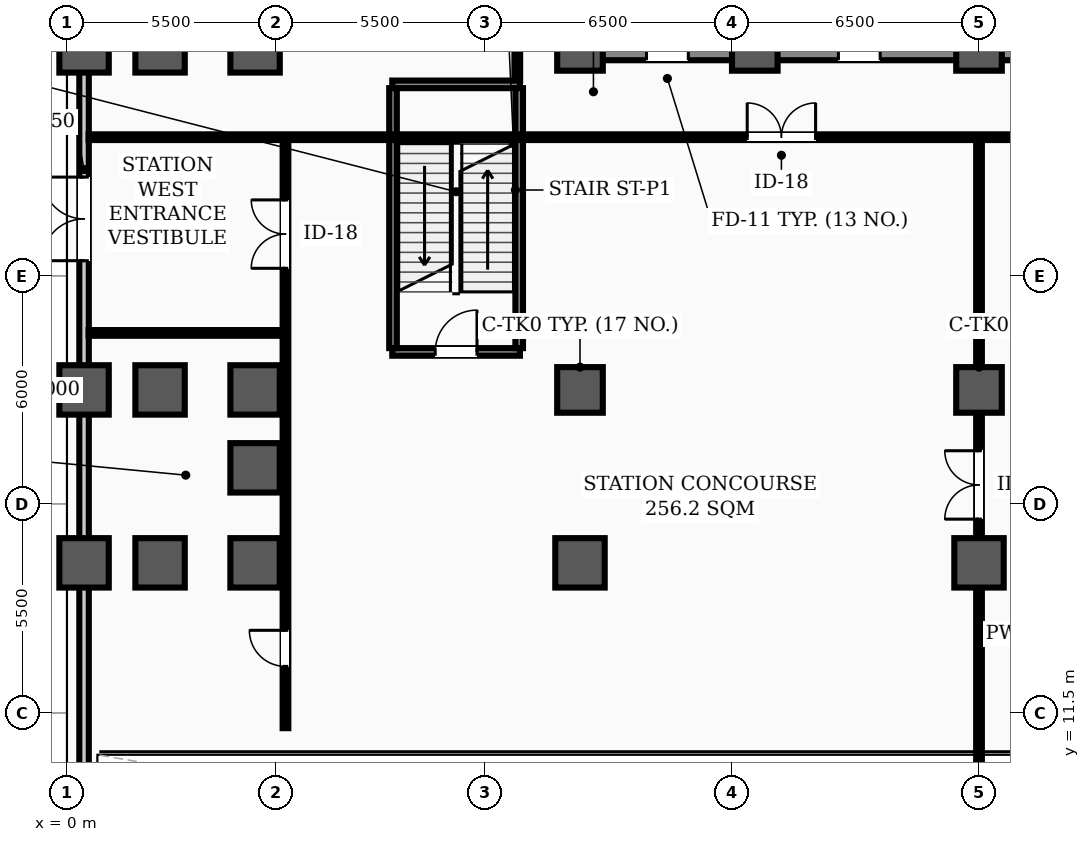
"""IFC4 building model, lengths in metres.
Left out: names, types, materials, properties, quantities, classifications, styles, units other than length and angle.
Written with IfcOpenShell. Run it as: python <this file> out.ifc"""

import sys

from ifc_helpers import new_model, si_unit, direction, frame, frame_2d, origin, origin_2d, place, context, subcontext, project, spatial, rectangle, hollow_rectangle, extrude, element, fill, save


model = new_model("IFC4")
c1 = context("Model", 3, precision=1e-05, world=origin(), true_north=direction((0.0, 1.0)))
c2 = subcontext(c1, "Body", "Model", "MODEL_VIEW")
j1 = project(units=[si_unit("LENGTHUNIT", "METRE"), si_unit("PLANEANGLEUNIT", "RADIAN")], contexts=[c1])
p1 = place(None, origin())
s1 = spatial("IfcSite", under=j1, at=p1, CompositionType="ELEMENT")
p2 = place(p1, origin())
s2 = spatial("IfcBuilding", under=s1, at=p2, CompositionType="ELEMENT")
p3 = place(p2, origin())
s3 = spatial("IfcBuildingStorey", under=s2, at=p3, CompositionType="ELEMENT", Elevation=0.0)
for number, where, z_axis, x_axis in (
    (1, (13.5, 29.0, 0.0), (0.0, 0.0, 1.0), (1.0, 0.0, 0.0)),
    (2, (18.1, 29.0, 0.0), (0.0, 0.0, 1.0), (1.0, 0.0, 0.0)),
    (3, (24.0, 29.0, 0.0), (0.0, 0.0, 1.0), (1.0, 0.0, 0.0)),
    (4, (13.5, 20.0, 0.0), (0.0, 0.0, 1.0), (1.0, 0.0, 0.0)),
    (5, (24.0, 20.0, 0.0), (0.0, 0.0, 1.0), (1.0, 0.0, 0.0)),
):
    element("IfcColumn", number, at=place(p3, frame(where, z_axis=z_axis, x_axis=x_axis)), inside=s3, PredefinedType="COLUMN", context=c2, shape_type="SweptSolid", body=[
        extrude(hollow_rectangle(XDim=1.2, YDim=1.2, WallThickness=0.04, InnerFilletRadius=0.02, OuterFilletRadius=0.06, at=origin_2d()), origin(), (0.0, 0.0, 1.0), 5.8),
    ])
for number, where, z_axis, x_axis in (
    (6, (0.45, 15.45, 0.0), (0.0, 0.0, 1.0), (1.0, 0.0, 0.0)),
    (7, (0.45, 20.0, 0.0), (0.0, 0.0, 1.0), (1.0, 0.0, 0.0)),
    (8, (0.45, 29.0, 0.0), (0.0, 0.0, 1.0), (1.0, 0.0, 0.0)),
    (9, (2.45, 15.45, 0.0), (0.0, 0.0, 1.0), (1.0, 0.0, 0.0)),
    (10, (2.45, 20.0, 0.0), (0.0, 0.0, 1.0), (1.0, 0.0, 0.0)),
    (11, (2.45, 29.0, 0.0), (0.0, 0.0, 1.0), (1.0, 0.0, 0.0)),
    (12, (4.95, 15.45, 0.0), (0.0, 0.0, 1.0), (1.0, 0.0, 0.0)),
    (13, (4.95, 17.95, 0.0), (0.0, 0.0, 1.0), (1.0, 0.0, 0.0)),
    (14, (4.95, 20.0, 0.0), (0.0, 0.0, 1.0), (1.0, 0.0, 0.0)),
    (15, (4.95, 29.0, 0.0), (0.0, 0.0, 1.0), (1.0, 0.0, 0.0)),
    (16, (13.5, 15.45, 0.0), (0.0, 0.0, 1.0), (1.0, 0.0, 0.0)),
    (17, (24.0, 15.45, 0.0), (0.0, 0.0, 1.0), (1.0, 0.0, 0.0)),
):
    element("IfcColumn", number, at=place(p3, frame(where, z_axis=z_axis, x_axis=x_axis)), inside=s3, PredefinedType="COLUMN", context=c2, shape_type="SweptSolid", body=[
        extrude(rectangle(XDim=1.3, YDim=1.3, at=origin_2d()), origin(), (0.0, 0.0, 1.0), 5.8),
    ])
p4 = place(p3, frame((0.45, 0.45, 0.0), z_axis=(0.0, 0.0, 1.0), x_axis=(0.0, 1.0, 0.0)))
e18 = element("IfcWall", 18, at=p4, inside=s3, PredefinedType="STANDARD", context=c2, shape_type="SweptSolid", body=[
    extrude(rectangle(XDim=50.7, YDim=0.25, at=frame_2d((25.35, 0.0))), origin(), (0.0, 0.0, 1.0), 4.75),
])
p5 = place(p4, frame((22.95, 0.0, 0.0)))
e19 = element("IfcOpeningElement", 19, at=p5, cuts=e18, PredefinedType="OPENING", context=c2, shape_type="SweptSolid", body=[
    extrude(rectangle(XDim=2.2, YDim=2.4, at=frame_2d((1.1, 1.2))), frame((0.0, 0.135, 0.0), z_axis=(0.0, -1.0, 0.0), x_axis=(1.0, 0.0, 0.0)), (0.0, 0.0, 1.0), 0.27),
])
p6 = place(p4, frame((4.45, 0.0, 0.0)))
e20 = element("IfcOpeningElement", 20, at=p6, cuts=e18, PredefinedType="OPENING", context=c2, shape_type="SweptSolid", body=[
    extrude(rectangle(XDim=4.8, YDim=2.85, at=frame_2d((2.4, 1.425))), frame((0.0, 0.135, 0.0), z_axis=(0.0, -1.0, 0.0), x_axis=(1.0, 0.0, 0.0)), (0.0, 0.0, 1.0), 0.27),
])
p7 = place(p3, frame((13.5, 29.0, 0.0), z_axis=(0.0, 0.0, 1.0), x_axis=(1.0, 0.0, 0.0)))
e21 = element("IfcWall", 21, at=p7, inside=s3, PredefinedType="SHEAR", context=c2, shape_type="SweptSolid", body=[
    extrude(rectangle(XDim=30.5, YDim=0.65, at=frame_2d((15.25, 0.0))), origin(), (0.0, 0.0, 1.0), 5.55),
])
p8 = place(p7, frame((1.75, 0.0, 0.0)))
e22 = element("IfcOpeningElement", 22, at=p8, cuts=e21, PredefinedType="OPENING", context=c2, shape_type="SweptSolid", body=[
    extrude(rectangle(XDim=1.1, YDim=2.08, at=frame_2d((0.55, 1.04))), frame((0.0, 0.335, 0.0), z_axis=(0.0, -1.0, 0.0), x_axis=(1.0, 0.0, 0.0)), (0.0, 0.0, 1.0), 0.67),
])
p9 = place(p7, frame((26.7, 0.0, 0.0)))
e23 = element("IfcOpeningElement", 23, at=p9, cuts=e21, PredefinedType="OPENING", context=c2, shape_type="SweptSolid", body=[
    extrude(rectangle(XDim=1.1, YDim=2.08, at=frame_2d((0.55, 1.04))), frame((0.0, 0.335, 0.0), z_axis=(0.0, -1.0, 0.0), x_axis=(1.0, 0.0, 0.0)), (0.0, 0.0, 1.0), 0.67),
])
p10 = place(p7, frame((6.8, 0.0, 0.0)))
e24 = element("IfcOpeningElement", 24, at=p10, cuts=e21, PredefinedType="OPENING", context=c2, shape_type="SweptSolid", body=[
    extrude(rectangle(XDim=1.1, YDim=2.08, at=frame_2d((0.55, 1.04))), frame((0.0, 0.335, 0.0), z_axis=(0.0, -1.0, 0.0), x_axis=(1.0, 0.0, 0.0)), (0.0, 0.0, 1.0), 0.67),
])
p11 = place(p7, frame((14.3, 0.0, 0.0)))
e25 = element("IfcOpeningElement", 25, at=p11, cuts=e21, PredefinedType="OPENING", context=c2, shape_type="SweptSolid", body=[
    extrude(rectangle(XDim=1.6, YDim=2.08, at=frame_2d((0.8, 1.04))), frame((0.0, 0.335, 0.0), z_axis=(0.0, -1.0, 0.0), x_axis=(1.0, 0.0, 0.0)), (0.0, 0.0, 1.0), 0.67),
])
p12 = place(p7, frame((20.525, 0.0, 0.0)))
e26 = element("IfcOpeningElement", 26, at=p12, cuts=e21, PredefinedType="OPENING", context=c2, shape_type="SweptSolid", body=[
    extrude(rectangle(XDim=0.95, YDim=2.08, at=frame_2d((0.475, 1.04))), frame((0.0, 0.335, 0.0), z_axis=(0.0, -1.0, 0.0), x_axis=(1.0, 0.0, 0.0)), (0.0, 0.0, 1.0), 0.67),
])
p13 = place(p7, frame((12.1, 0.0, 0.0)))
e27 = element("IfcOpeningElement", 27, at=p13, cuts=e21, PredefinedType="OPENING", context=c2, shape_type="SweptSolid", body=[
    extrude(rectangle(XDim=1.3, YDim=2.08, at=frame_2d((0.65, 1.04))), frame((0.0, 0.335, 0.0), z_axis=(0.0, -1.0, 0.0), x_axis=(1.0, 0.0, 0.0)), (0.0, 0.0, 1.0), 0.67),
])
p14 = place(p3, frame((8.56, 21.0, 0.0), z_axis=(0.0, 0.0, 1.0), x_axis=(1.0, 0.0, 0.0)))
e28 = element("IfcWall", 28, at=p14, inside=s3, PredefinedType="STANDARD", context=c2, shape_type="SweptSolid", body=[
    extrude(rectangle(XDim=3.36, YDim=0.2, at=frame_2d((1.68, 0.0))), origin(), (0.0, 0.0, 1.0), 5.55),
])
p15 = place(p14, frame((1.13, 0.0, 0.0)))
e29 = element("IfcOpeningElement", 29, at=p15, cuts=e28, PredefinedType="OPENING", context=c2, shape_type="SweptSolid", body=[
    extrude(rectangle(XDim=1.1, YDim=2.08, at=frame_2d((0.55, 1.04))), frame((0.0, 0.11, 0.0), z_axis=(0.0, -1.0, 0.0), x_axis=(1.0, 0.0, 0.0)), (0.0, 0.0, 1.0), 0.22),
])
p16 = place(p3, frame((8.56, 28.04, 0.0), z_axis=(0.0, 0.0, 1.0), x_axis=(1.0, 0.0, 0.0)))
e30 = element("IfcWall", 30, at=p16, inside=s3, PredefinedType="STANDARD", context=c2, shape_type="SweptSolid", body=[
    extrude(rectangle(XDim=3.36, YDim=0.2, at=frame_2d((1.68, 0.0))), origin(), (0.0, 0.0, 1.0), 5.55),
])
for number, where, z_axis, x_axis in (
    (31, (8.58, 21.1, 0.0), (0.0, 0.0, 1.0), (0.0, 1.0, 0.0)),
    (32, (11.9, 21.1, 0.0), (0.0, 0.0, 1.0), (0.0, 1.0, 0.0)),
):
    element("IfcWall", number, at=place(p3, frame(where, z_axis=z_axis, x_axis=x_axis)), inside=s3, PredefinedType="STANDARD", context=c2, shape_type="SweptSolid", body=[
        extrude(rectangle(XDim=6.84, YDim=0.2, at=frame_2d((3.42, 0.0))), origin(), (0.0, 0.0, 1.0), 5.55),
    ])
p17 = place(p3, frame((0.57, 21.5, 0.0), z_axis=(0.0, 0.0, 1.0), x_axis=(1.0, 0.0, 0.0)))
e33 = element("IfcWall", 33, at=p17, inside=s3, PredefinedType="PARTITIONING", context=c2, shape_type="SweptSolid", body=[
    extrude(rectangle(XDim=5.18, YDim=0.15, at=frame_2d((2.59, 0.0))), origin(), (0.0, 0.0, 1.0), 4.83),
])
p18 = place(p3, frame((0.57, 26.65, 0.0), z_axis=(0.0, 0.0, 1.0), x_axis=(1.0, 0.0, 0.0)))
e34 = element("IfcWall", 34, at=p18, inside=s3, PredefinedType="PARTITIONING", context=c2, shape_type="SweptSolid", body=[
    extrude(rectangle(XDim=58.78, YDim=0.15, at=frame_2d((29.39, 0.0))), origin(), (0.0, 0.0, 1.0), 4.83),
])
p19 = place(p18, frame((17.33, 0.0, 0.0)))
e35 = element("IfcOpeningElement", 35, at=p19, cuts=e34, PredefinedType="OPENING", context=c2, shape_type="SweptSolid", body=[
    extrude(rectangle(XDim=1.8, YDim=2.08, at=frame_2d((0.9, 1.04))), frame((0.0, 0.085, 0.0), z_axis=(0.0, -1.0, 0.0), x_axis=(1.0, 0.0, 0.0)), (0.0, 0.0, 1.0), 0.17),
])
p20 = place(p18, frame((32.78, 0.0, 0.0)))
e36 = element("IfcOpeningElement", 36, at=p20, cuts=e34, PredefinedType="OPENING", context=c2, shape_type="SweptSolid", body=[
    extrude(rectangle(XDim=1.8, YDim=2.08, at=frame_2d((0.9, 1.04))), frame((0.0, 0.085, 0.0), z_axis=(0.0, -1.0, 0.0), x_axis=(1.0, 0.0, 0.0)), (0.0, 0.0, 1.0), 0.17),
])
p21 = place(p18, frame((46.555, 0.0, 0.0)))
e37 = element("IfcOpeningElement", 37, at=p21, cuts=e34, PredefinedType="OPENING", context=c2, shape_type="SweptSolid", body=[
    extrude(rectangle(XDim=0.95, YDim=2.08, at=frame_2d((0.475, 1.04))), frame((0.0, 0.085, 0.0), z_axis=(0.0, -1.0, 0.0), x_axis=(1.0, 0.0, 0.0)), (0.0, 0.0, 1.0), 0.17),
])
p22 = place(p18, frame((51.105, 0.0, 0.0)))
e38 = element("IfcOpeningElement", 38, at=p22, cuts=e34, PredefinedType="OPENING", context=c2, shape_type="SweptSolid", body=[
    extrude(rectangle(XDim=0.95, YDim=2.08, at=frame_2d((0.475, 1.04))), frame((0.0, 0.085, 0.0), z_axis=(0.0, -1.0, 0.0), x_axis=(1.0, 0.0, 0.0)), (0.0, 0.0, 1.0), 0.17),
])
p23 = place(p18, frame((55.355, 0.0, 0.0)))
e39 = element("IfcOpeningElement", 39, at=p23, cuts=e34, PredefinedType="OPENING", context=c2, shape_type="SweptSolid", body=[
    extrude(rectangle(XDim=0.95, YDim=2.08, at=frame_2d((0.475, 1.04))), frame((0.0, 0.085, 0.0), z_axis=(0.0, -1.0, 0.0), x_axis=(1.0, 0.0, 0.0)), (0.0, 0.0, 1.0), 0.17),
])
p24 = place(p3, frame((5.75, 11.1, 0.0), z_axis=(0.0, 0.0, 1.0), x_axis=(0.0, 1.0, 0.0)))
e40 = element("IfcWall", 40, at=p24, inside=s3, PredefinedType="PARTITIONING", context=c2, shape_type="SweptSolid", body=[
    extrude(rectangle(XDim=15.465, YDim=0.15, at=frame_2d((7.732, 0.0))), origin(), (0.0, 0.0, 1.0), 4.73),
])
p25 = place(p24, frame((12.1, 0.0, 0.0)))
e41 = element("IfcOpeningElement", 41, at=p25, cuts=e40, PredefinedType="OPENING", context=c2, shape_type="SweptSolid", body=[
    extrude(rectangle(XDim=1.8, YDim=2.08, at=frame_2d((0.9, 1.04))), frame((0.0, 0.085, 0.0), z_axis=(0.0, -1.0, 0.0), x_axis=(1.0, 0.0, 0.0)), (0.0, 0.0, 1.0), 0.17),
])
p26 = place(p24, frame((1.625, 0.0, 0.0)))
e42 = element("IfcOpeningElement", 42, at=p26, cuts=e40, PredefinedType="OPENING", context=c2, shape_type="SweptSolid", body=[
    extrude(rectangle(XDim=0.95, YDim=2.08, at=frame_2d((0.475, 1.04))), frame((0.0, 0.085, 0.0), z_axis=(0.0, -1.0, 0.0), x_axis=(1.0, 0.0, 0.0)), (0.0, 0.0, 1.0), 0.17),
])
p27 = place(p3, frame((24.0, 0.57, 0.0), z_axis=(0.0, 0.0, 1.0), x_axis=(0.0, 1.0, 0.0)))
e43 = element("IfcWall", 43, at=p27, inside=s3, PredefinedType="PARTITIONING", context=c2, shape_type="SweptSolid", body=[
    extrude(rectangle(XDim=25.995, YDim=0.15, at=frame_2d((12.998, 0.0))), origin(), (0.0, 0.0, 1.0), 4.73),
])
p28 = place(p27, frame((16.03, 0.0, 0.0)))
e44 = element("IfcOpeningElement", 44, at=p28, cuts=e43, PredefinedType="OPENING", context=c2, shape_type="SweptSolid", body=[
    extrude(rectangle(XDim=1.8, YDim=2.08, at=frame_2d((0.9, 1.04))), frame((0.0, 0.085, 0.0), z_axis=(0.0, -1.0, 0.0), x_axis=(1.0, 0.0, 0.0)), (0.0, 0.0, 1.0), 0.17),
])
p29 = place(p3, frame((11.85, 28.15, 0.0), z_axis=(0.0, 0.0, 1.0), x_axis=(0.0, 1.0, 0.0)))
e45 = element("IfcWall", 45, at=p29, inside=s3, PredefinedType="PARTITIONING", context=c2, shape_type="SweptSolid", body=[
    extrude(rectangle(XDim=8.49, YDim=0.15, at=frame_2d((4.245, 0.0))), origin(), (0.0, 0.0, 1.0), 4.73),
])
p30 = place(p5, origin())
e46 = element("IfcDoor", 46, at=p30, inside=s3, OperationType="DOUBLE_DOOR_SINGLE_SWING", PredefinedType="DOOR", context=c2, shape_type="SweptSolid", body=[
    extrude(rectangle(XDim=2.2, YDim=2.4, at=frame_2d((1.1, 1.2))), frame((0.0, 0.025, 0.0), z_axis=(0.0, -1.0, 0.0), x_axis=(1.0, 0.0, 0.0)), (0.0, 0.0, 1.0), 0.05),
])
fill(e19, e46)
p31 = place(p15, origin())
e47 = element("IfcDoor", 47, at=p31, inside=s3, OperationType="SINGLE_SWING_RIGHT", PredefinedType="DOOR", context=c2, shape_type="SweptSolid", body=[
    extrude(rectangle(XDim=1.1, YDim=2.08, at=frame_2d((0.55, 1.04))), frame((0.0, 0.025, 0.0), z_axis=(0.0, -1.0, 0.0), x_axis=(1.0, 0.0, 0.0)), (0.0, 0.0, 1.0), 0.05),
])
fill(e29, e47)
p32 = place(p19, origin())
e48 = element("IfcDoor", 48, at=p32, inside=s3, OperationType="DOUBLE_DOOR_SINGLE_SWING", PredefinedType="DOOR", context=c2, shape_type="SweptSolid", body=[
    extrude(rectangle(XDim=1.8, YDim=2.08, at=frame_2d((0.9, 1.04))), frame((0.0, 0.025, 0.0), z_axis=(0.0, -1.0, 0.0), x_axis=(1.0, 0.0, 0.0)), (0.0, 0.0, 1.0), 0.05),
])
fill(e35, e48)
p33 = place(p28, origin())
e49 = element("IfcDoor", 49, at=p33, inside=s3, OperationType="DOUBLE_DOOR_SINGLE_SWING", PredefinedType="DOOR", context=c2, shape_type="SweptSolid", body=[
    extrude(rectangle(XDim=1.8, YDim=2.08, at=frame_2d((0.9, 1.04))), frame((0.0, 0.025, 0.0), z_axis=(0.0, -1.0, 0.0), x_axis=(1.0, 0.0, 0.0)), (0.0, 0.0, 1.0), 0.05),
])
fill(e44, e49)
p34 = place(p25, origin())
e50 = element("IfcDoor", 50, at=p34, inside=s3, OperationType="DOUBLE_DOOR_SINGLE_SWING", PredefinedType="DOOR", context=c2, shape_type="SweptSolid", body=[
    extrude(rectangle(XDim=1.8, YDim=2.08, at=frame_2d((0.9, 1.04))), frame((0.0, 0.025, 0.0), z_axis=(0.0, -1.0, 0.0), x_axis=(1.0, 0.0, 0.0)), (0.0, 0.0, 1.0), 0.05),
])
fill(e41, e50)
p35 = place(p26, origin())
e51 = element("IfcDoor", 51, at=p35, inside=s3, OperationType="SINGLE_SWING_RIGHT", PredefinedType="DOOR", context=c2, shape_type="SweptSolid", body=[
    extrude(rectangle(XDim=0.95, YDim=2.08, at=frame_2d((0.475, 1.04))), frame((0.0, 0.025, 0.0), z_axis=(0.0, -1.0, 0.0), x_axis=(1.0, 0.0, 0.0)), (0.0, 0.0, 1.0), 0.05),
])
fill(e42, e51)
save(model, sys.argv[1])
